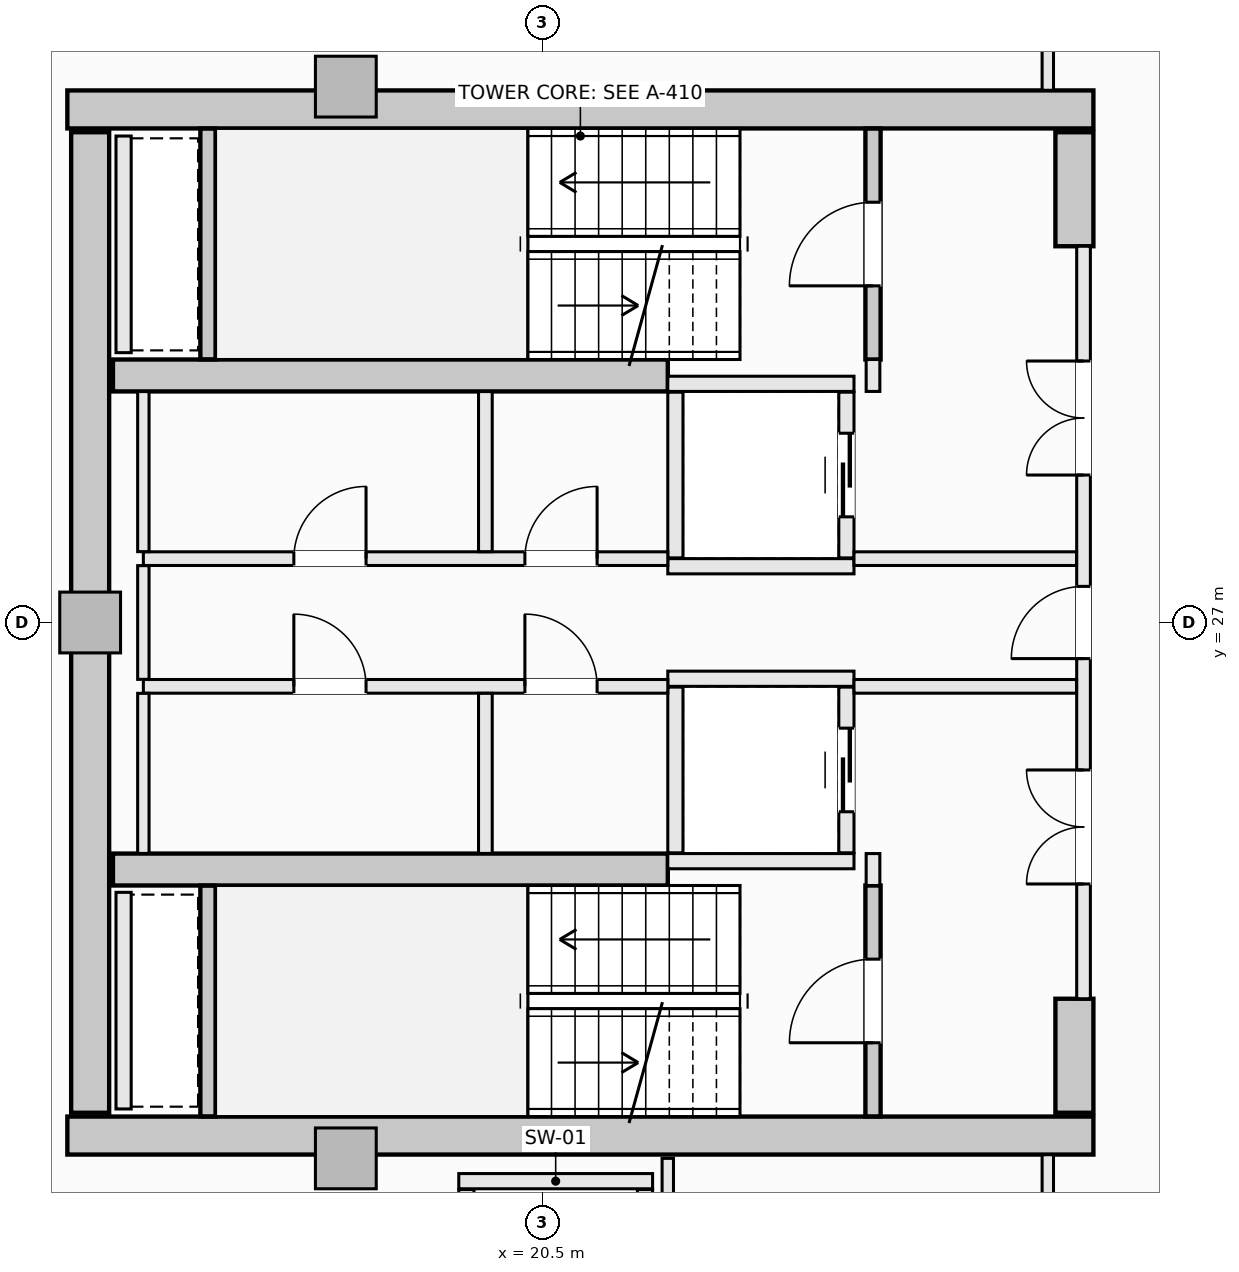
"""IFC4 building model, lengths in metres.
Left out: names, types, materials, properties, quantities, classifications, styles, units other than length and angle.
Written with IfcOpenShell. Run it as: python <this file> out.ifc"""

import sys

from ifc_helpers import new_model, si_unit, direction, frame, frame_2d, origin, origin_2d, place, context, subcontext, project, spatial, rectangle, extrude, element, fill, save


model = new_model("IFC4")
c1 = context("Model", 3, precision=1e-05, world=origin(), true_north=direction((0.0, 1.0)))
c2 = subcontext(c1, "Body", "Model", "MODEL_VIEW")
j1 = project(units=[si_unit("LENGTHUNIT", "METRE"), si_unit("PLANEANGLEUNIT", "RADIAN")], contexts=[c1])
p1 = place(None, origin())
s1 = spatial("IfcSite", under=j1, at=p1, CompositionType="ELEMENT")
p2 = place(p1, origin())
s2 = spatial("IfcBuilding", under=s1, at=p2, CompositionType="ELEMENT")
p3 = place(p2, frame((0.0, 0.0, 236.0)))
s3 = spatial("IfcBuildingStorey", under=s2, at=p3, CompositionType="ELEMENT", Elevation=236.0)
for number, where, z_axis, x_axis in (
    (1, (14.25, 33.75, -0.27), (0.0, 0.0, 1.0), (1.0, 0.0, 0.0)),
    (2, (14.25, 20.25, -0.27), (0.0, 0.0, 1.0), (1.0, 0.0, 0.0)),
):
    element("IfcWall", number, at=place(p3, frame(where, z_axis=z_axis, x_axis=x_axis)), inside=s3, PredefinedType="SHEAR", context=c2, shape_type="SweptSolid", body=[
        extrude(rectangle(XDim=13.5, YDim=0.5, at=frame_2d((6.75, 0.0))), origin(), (0.0, 0.0, 1.0), 3.3),
    ])
p4 = place(p3, frame((14.55, 20.55, -0.27), z_axis=(0.0, 0.0, 1.0), x_axis=(0.0, 1.0, 0.0)))
e3 = element("IfcWall", 3, at=p4, inside=s3, PredefinedType="SHEAR", context=c2, shape_type="SweptSolid", body=[
    extrude(rectangle(XDim=12.9, YDim=0.5, at=frame_2d((6.45, 0.0))), origin(), (0.0, 0.0, 1.0), 3.3),
])
for number, where, z_axis, x_axis in (
    (4, (27.5, 31.95, -0.27), (0.0, 0.0, 1.0), (0.0, 1.0, 0.0)),
    (5, (27.5, 20.55, -0.27), (0.0, 0.0, 1.0), (0.0, 1.0, 0.0)),
):
    element("IfcWall", number, at=place(p3, frame(where, z_axis=z_axis, x_axis=x_axis)), inside=s3, PredefinedType="SHEAR", context=c2, shape_type="SweptSolid", body=[
        extrude(rectangle(XDim=1.5, YDim=0.5, at=frame_2d((0.75, 0.0))), origin(), (0.0, 0.0, 1.0), 3.3),
    ])
for number, where, z_axis, x_axis in (
    (6, (14.85, 30.25, -0.27), (0.0, 0.0, 1.0), (1.0, 0.0, 0.0)),
    (7, (14.85, 23.75, -0.27), (0.0, 0.0, 1.0), (1.0, 0.0, 0.0)),
):
    element("IfcWall", number, at=place(p3, frame(where, z_axis=z_axis, x_axis=x_axis)), inside=s3, PredefinedType="SHEAR", context=c2, shape_type="SweptSolid", body=[
        extrude(rectangle(XDim=7.3, YDim=0.42, at=frame_2d((3.65, 0.0))), origin(), (0.0, 0.0, 1.0), 3.3),
    ])
for number, where, z_axis, x_axis in (
    (8, (17.914, 34.05, -0.27), (0.0, 0.0, 1.0), (1.0, 0.0, 0.0)),
    (9, (14.55, 27.0, -0.27), (0.0, 0.0, 1.0), (1.0, 0.0, 0.0)),
    (10, (17.914, 19.95, -0.27), (0.0, 0.0, 1.0), (1.0, 0.0, 0.0)),
):
    element("IfcColumn", number, at=place(p3, frame(where, z_axis=z_axis, x_axis=x_axis)), inside=s3, PredefinedType="PILASTER", context=c2, shape_type="SweptSolid", body=[
        extrude(rectangle(XDim=0.8, YDim=0.8, at=origin_2d()), origin(), (0.0, 0.0, 1.0), 3.3),
    ])
p5 = place(p3, frame((24.85, 30.46, -0.27), z_axis=(0.0, 0.0, 1.0), x_axis=(0.0, 1.0, 0.0)))
e11 = element("IfcWall", 11, at=p5, inside=s3, PredefinedType="SHEAR", context=c2, shape_type="SweptSolid", body=[
    extrude(rectangle(XDim=3.038, YDim=0.2, at=frame_2d((1.519, 0.0))), origin(), (0.0, 0.0, 1.0), 3.3),
])
p6 = place(p5, frame((0.969, 0.0, 0.27)))
e12 = element("IfcOpeningElement", 12, at=p6, cuts=e11, PredefinedType="OPENING", context=c2, shape_type="SweptSolid", body=[
    extrude(rectangle(XDim=1.1, YDim=2.15, at=frame_2d((0.55, 1.075))), frame((0.0, 0.11, 0.0), z_axis=(0.0, -1.0, 0.0), x_axis=(1.0, 0.0, 0.0)), (0.0, 0.0, 1.0), 0.22),
])
p7 = place(p3, frame((16.1, 30.462, -0.27), z_axis=(0.0, 0.0, 1.0), x_axis=(0.0, 1.0, 0.0)))
e13 = element("IfcWall", 13, at=p7, inside=s3, PredefinedType="SHEAR", context=c2, shape_type="SweptSolid", body=[
    extrude(rectangle(XDim=3.036, YDim=0.2, at=frame_2d((1.518, 0.0))), origin(), (0.0, 0.0, 1.0), 3.3),
])
p8 = place(p3, frame((24.85, 20.502, -0.27), z_axis=(0.0, 0.0, 1.0), x_axis=(0.0, 1.0, 0.0)))
e14 = element("IfcWall", 14, at=p8, inside=s3, PredefinedType="SHEAR", context=c2, shape_type="SweptSolid", body=[
    extrude(rectangle(XDim=3.038, YDim=0.2, at=frame_2d((1.519, 0.0))), origin(), (0.0, 0.0, 1.0), 3.3),
])
p9 = place(p8, frame((0.969, 0.0, 0.27)))
e15 = element("IfcOpeningElement", 15, at=p9, cuts=e14, PredefinedType="OPENING", context=c2, shape_type="SweptSolid", body=[
    extrude(rectangle(XDim=1.1, YDim=2.15, at=frame_2d((0.55, 1.075))), frame((0.0, 0.11, 0.0), z_axis=(0.0, -1.0, 0.0), x_axis=(1.0, 0.0, 0.0)), (0.0, 0.0, 1.0), 0.22),
])
p10 = place(p3, frame((16.1, 20.502, -0.27), z_axis=(0.0, 0.0, 1.0), x_axis=(0.0, 1.0, 0.0)))
e16 = element("IfcWall", 16, at=p10, inside=s3, PredefinedType="SHEAR", context=c2, shape_type="SweptSolid", body=[
    extrude(rectangle(XDim=3.036, YDim=0.2, at=frame_2d((1.518, 0.0))), origin(), (0.0, 0.0, 1.0), 3.3),
])
for number, where, z_axis, x_axis in (
    (17, (22.15, 30.14, 0.0), (0.0, 0.0, 1.0), (1.0, 0.0, 0.0)),
    (18, (22.15, 27.74, 0.0), (0.0, 0.0, 1.0), (1.0, 0.0, 0.0)),
):
    element("IfcWall", number, at=place(p3, frame(where, z_axis=z_axis, x_axis=x_axis)), inside=s3, PredefinedType="SOLIDWALL", context=c2, shape_type="SweptSolid", body=[
        extrude(rectangle(XDim=2.45, YDim=0.2, at=frame_2d((1.225, 0.0))), origin(), (0.0, 0.0, 1.0), 3.03),
    ])
p11 = place(p3, frame((22.25, 27.85, 0.0), z_axis=(0.0, 0.0, 1.0), x_axis=(0.0, 1.0, 0.0)))
e19 = element("IfcWall", 19, at=p11, inside=s3, PredefinedType="SOLIDWALL", context=c2, shape_type="SweptSolid", body=[
    extrude(rectangle(XDim=2.18, YDim=0.2, at=frame_2d((1.09, 0.0))), origin(), (0.0, 0.0, 1.0), 3.03),
])
p12 = place(p3, frame((24.5, 27.85, 0.0), z_axis=(0.0, 0.0, 1.0), x_axis=(0.0, 1.0, 0.0)))
e20 = element("IfcWall", 20, at=p12, inside=s3, PredefinedType="SOLIDWALL", context=c2, shape_type="SweptSolid", body=[
    extrude(rectangle(XDim=2.18, YDim=0.2, at=frame_2d((1.09, 0.0))), origin(), (0.0, 0.0, 1.0), 3.03),
])
p13 = place(p12, frame((0.54, 0.0, 0.0)))
e21 = element("IfcOpeningElement", 21, at=p13, cuts=e20, PredefinedType="OPENING", context=c2, shape_type="SweptSolid", body=[
    extrude(rectangle(XDim=1.1, YDim=2.2, at=frame_2d((0.55, 1.1))), frame((0.0, 0.11, 0.0), z_axis=(0.0, -1.0, 0.0), x_axis=(1.0, 0.0, 0.0)), (0.0, 0.0, 1.0), 0.22),
])
for number, where, z_axis, x_axis in (
    (22, (22.15, 26.26, 0.0), (0.0, 0.0, 1.0), (1.0, 0.0, 0.0)),
    (23, (22.15, 23.86, 0.0), (0.0, 0.0, 1.0), (1.0, 0.0, 0.0)),
):
    element("IfcWall", number, at=place(p3, frame(where, z_axis=z_axis, x_axis=x_axis)), inside=s3, PredefinedType="SOLIDWALL", context=c2, shape_type="SweptSolid", body=[
        extrude(rectangle(XDim=2.45, YDim=0.2, at=frame_2d((1.225, 0.0))), origin(), (0.0, 0.0, 1.0), 3.03),
    ])
p14 = place(p3, frame((22.25, 23.97, 0.0), z_axis=(0.0, 0.0, 1.0), x_axis=(0.0, 1.0, 0.0)))
e24 = element("IfcWall", 24, at=p14, inside=s3, PredefinedType="SOLIDWALL", context=c2, shape_type="SweptSolid", body=[
    extrude(rectangle(XDim=2.18, YDim=0.2, at=frame_2d((1.09, 0.0))), origin(), (0.0, 0.0, 1.0), 3.03),
])
p15 = place(p3, frame((24.5, 23.97, 0.0), z_axis=(0.0, 0.0, 1.0), x_axis=(0.0, 1.0, 0.0)))
e25 = element("IfcWall", 25, at=p15, inside=s3, PredefinedType="SOLIDWALL", context=c2, shape_type="SweptSolid", body=[
    extrude(rectangle(XDim=2.18, YDim=0.2, at=frame_2d((1.09, 0.0))), origin(), (0.0, 0.0, 1.0), 3.03),
])
p16 = place(p15, frame((0.54, 0.0, 0.0)))
e26 = element("IfcOpeningElement", 26, at=p16, cuts=e25, PredefinedType="OPENING", context=c2, shape_type="SweptSolid", body=[
    extrude(rectangle(XDim=1.1, YDim=2.2, at=frame_2d((0.55, 1.1))), frame((0.0, 0.11, 0.0), z_axis=(0.0, -1.0, 0.0), x_axis=(1.0, 0.0, 0.0)), (0.0, 0.0, 1.0), 0.22),
])
p17 = place(p3, frame((19.4, 19.65, 0.0), z_axis=(0.0, 0.0, 1.0), x_axis=(1.0, 0.0, 0.0)))
e27 = element("IfcWall", 27, at=p17, inside=s3, PredefinedType="SOLIDWALL", context=c2, shape_type="SweptSolid", body=[
    extrude(rectangle(XDim=2.55, YDim=0.2, at=frame_2d((1.275, 0.0))), origin(), (0.0, 0.0, 1.0), 3.03),
])
for number, where, z_axis, x_axis in (
    (28, (19.5, 17.01, 0.0), (0.0, 0.0, 1.0), (0.0, 1.0, 0.0)),
    (29, (21.85, 17.01, 0.0), (0.0, 0.0, 1.0), (0.0, 1.0, 0.0)),
):
    element("IfcWall", number, at=place(p3, frame(where, z_axis=z_axis, x_axis=x_axis)), inside=s3, PredefinedType="SOLIDWALL", context=c2, shape_type="SweptSolid", body=[
        extrude(rectangle(XDim=2.53, YDim=0.2, at=frame_2d((1.265, 0.0))), origin(), (0.0, 0.0, 1.0), 3.03),
    ])
for number, where, z_axis, x_axis in (
    (30, (14.99, 30.55, 0.0), (0.0, 0.0, 1.0), (0.0, 1.0, 0.0)),
    (31, (14.99, 20.6, 0.0), (0.0, 0.0, 1.0), (0.0, 1.0, 0.0)),
):
    element("IfcWall", number, at=place(p3, frame(where, z_axis=z_axis, x_axis=x_axis)), inside=s3, PredefinedType="SOLIDWALL", context=c2, shape_type="SweptSolid", body=[
        extrude(rectangle(XDim=2.85, YDim=0.2, at=frame_2d((1.425, 0.0))), origin(), (0.0, 0.0, 1.0), 3.03),
    ])
for number, where, z_axis, x_axis in (
    (32, (24.85, 23.54, 0.0), (0.0, 0.0, 1.0), (0.0, 1.0, 0.0)),
    (33, (24.85, 30.04, 0.0), (0.0, 0.0, 1.0), (0.0, 1.0, 0.0)),
):
    element("IfcWall", number, at=place(p3, frame(where, z_axis=z_axis, x_axis=x_axis)), inside=s3, PredefinedType="SOLIDWALL", context=c2, shape_type="SweptSolid", body=[
        extrude(rectangle(XDim=0.42, YDim=0.18, at=frame_2d((0.21, 0.0))), origin(), (0.0, 0.0, 1.0), 3.03),
    ])
p18 = place(p3, frame((27.62, 22.05, 0.0), z_axis=(0.0, 0.0, 1.0), x_axis=(0.0, 1.0, 0.0)))
e34 = element("IfcWall", 34, at=p18, inside=s3, PredefinedType="SOLIDWALL", context=c2, shape_type="SweptSolid", body=[
    extrude(rectangle(XDim=9.9, YDim=0.18, at=frame_2d((4.95, 0.0))), origin(), (0.0, 0.0, 1.0), 3.03),
])
p19 = place(p18, frame((4.475, 0.0, 0.0)))
e35 = element("IfcOpeningElement", 35, at=p19, cuts=e34, PredefinedType="OPENING", context=c2, shape_type="SweptSolid", body=[
    extrude(rectangle(XDim=0.95, YDim=2.1, at=frame_2d((0.475, 1.05))), frame((0.0, 0.1, 0.0), z_axis=(0.0, -1.0, 0.0), x_axis=(1.0, 0.0, 0.0)), (0.0, 0.0, 1.0), 0.2),
])
p20 = place(p18, frame((6.89, 0.0, 0.0)))
e36 = element("IfcOpeningElement", 36, at=p20, cuts=e34, PredefinedType="OPENING", context=c2, shape_type="SweptSolid", body=[
    extrude(rectangle(XDim=1.5, YDim=2.2, at=frame_2d((0.75, 1.1))), frame((0.0, 0.1, 0.0), z_axis=(0.0, -1.0, 0.0), x_axis=(1.0, 0.0, 0.0)), (0.0, 0.0, 1.0), 0.2),
])
p21 = place(p18, frame((1.51, 0.0, 0.0)))
e37 = element("IfcOpeningElement", 37, at=p21, cuts=e34, PredefinedType="OPENING", context=c2, shape_type="SweptSolid", body=[
    extrude(rectangle(XDim=1.5, YDim=2.2, at=frame_2d((0.75, 1.1))), frame((0.0, 0.1, 0.0), z_axis=(0.0, -1.0, 0.0), x_axis=(1.0, 0.0, 0.0)), (0.0, 0.0, 1.0), 0.2),
])
p22 = place(p3, frame((15.25, 27.84, 0.0), z_axis=(0.0, 0.0, 1.0), x_axis=(1.0, 0.0, 0.0)))
e38 = element("IfcWall", 38, at=p22, inside=s3, PredefinedType="SOLIDWALL", context=c2, shape_type="SweptSolid", body=[
    extrude(rectangle(XDim=6.9, YDim=0.18, at=frame_2d((3.45, 0.0))), origin(), (0.0, 0.0, 1.0), 3.03),
])
p23 = place(p22, frame((5.02, 0.0, 0.0)))
e39 = element("IfcOpeningElement", 39, at=p23, cuts=e38, PredefinedType="OPENING", context=c2, shape_type="SweptSolid", body=[
    extrude(rectangle(XDim=0.95, YDim=2.1, at=frame_2d((0.475, 1.05))), frame((0.0, 0.1, 0.0), z_axis=(0.0, -1.0, 0.0), x_axis=(1.0, 0.0, 0.0)), (0.0, 0.0, 1.0), 0.2),
])
p24 = place(p22, frame((1.98, 0.0, 0.0)))
e40 = element("IfcOpeningElement", 40, at=p24, cuts=e38, PredefinedType="OPENING", context=c2, shape_type="SweptSolid", body=[
    extrude(rectangle(XDim=0.95, YDim=2.1, at=frame_2d((0.475, 1.05))), frame((0.0, 0.1, 0.0), z_axis=(0.0, -1.0, 0.0), x_axis=(1.0, 0.0, 0.0)), (0.0, 0.0, 1.0), 0.2),
])
p25 = place(p3, frame((24.6, 27.84, 0.0), z_axis=(0.0, 0.0, 1.0), x_axis=(1.0, 0.0, 0.0)))
e41 = element("IfcWall", 41, at=p25, inside=s3, PredefinedType="SOLIDWALL", context=c2, shape_type="SweptSolid", body=[
    extrude(rectangle(XDim=2.928, YDim=0.18, at=frame_2d((1.464, 0.0))), origin(), (0.0, 0.0, 1.0), 3.03),
])
p26 = place(p3, frame((15.25, 26.16, 0.0), z_axis=(0.0, 0.0, 1.0), x_axis=(1.0, 0.0, 0.0)))
e42 = element("IfcWall", 42, at=p26, inside=s3, PredefinedType="SOLIDWALL", context=c2, shape_type="SweptSolid", body=[
    extrude(rectangle(XDim=6.9, YDim=0.18, at=frame_2d((3.45, 0.0))), origin(), (0.0, 0.0, 1.0), 3.03),
])
p27 = place(p26, frame((5.02, 0.0, 0.0)))
e43 = element("IfcOpeningElement", 43, at=p27, cuts=e42, PredefinedType="OPENING", context=c2, shape_type="SweptSolid", body=[
    extrude(rectangle(XDim=0.95, YDim=2.1, at=frame_2d((0.475, 1.05))), frame((0.0, 0.1, 0.0), z_axis=(0.0, -1.0, 0.0), x_axis=(1.0, 0.0, 0.0)), (0.0, 0.0, 1.0), 0.2),
])
p28 = place(p26, frame((1.98, 0.0, 0.0)))
e44 = element("IfcOpeningElement", 44, at=p28, cuts=e42, PredefinedType="OPENING", context=c2, shape_type="SweptSolid", body=[
    extrude(rectangle(XDim=0.95, YDim=2.1, at=frame_2d((0.475, 1.05))), frame((0.0, 0.1, 0.0), z_axis=(0.0, -1.0, 0.0), x_axis=(1.0, 0.0, 0.0)), (0.0, 0.0, 1.0), 0.2),
])
p29 = place(p3, frame((24.6, 26.16, 0.0), z_axis=(0.0, 0.0, 1.0), x_axis=(1.0, 0.0, 0.0)))
e45 = element("IfcWall", 45, at=p29, inside=s3, PredefinedType="SOLIDWALL", context=c2, shape_type="SweptSolid", body=[
    extrude(rectangle(XDim=2.928, YDim=0.18, at=frame_2d((1.464, 0.0))), origin(), (0.0, 0.0, 1.0), 3.03),
])
p30 = place(p3, frame((15.25, 23.962, 0.0), z_axis=(0.0, 0.0, 1.0), x_axis=(0.0, 1.0, 0.0)))
e46 = element("IfcWall", 46, at=p30, inside=s3, PredefinedType="PARTITIONING", context=c2, shape_type="SweptSolid", body=[
    extrude(rectangle(XDim=2.106, YDim=0.15, at=frame_2d((1.053, 0.0))), origin(), (0.0, 0.0, 1.0), 3.03),
])
p31 = place(p3, frame((15.25, 26.252, 0.0), z_axis=(0.0, 0.0, 1.0), x_axis=(0.0, 1.0, 0.0)))
e47 = element("IfcWall", 47, at=p31, inside=s3, PredefinedType="PARTITIONING", context=c2, shape_type="SweptSolid", body=[
    extrude(rectangle(XDim=1.496, YDim=0.15, at=frame_2d((0.748, 0.0))), origin(), (0.0, 0.0, 1.0), 3.03),
])
p32 = place(p3, frame((15.25, 27.932, 0.0), z_axis=(0.0, 0.0, 1.0), x_axis=(0.0, 1.0, 0.0)))
e48 = element("IfcWall", 48, at=p32, inside=s3, PredefinedType="PARTITIONING", context=c2, shape_type="SweptSolid", body=[
    extrude(rectangle(XDim=2.106, YDim=0.15, at=frame_2d((1.053, 0.0))), origin(), (0.0, 0.0, 1.0), 3.03),
])
for number, where, z_axis, x_axis in (
    (49, (19.75, 23.962, 0.0), (0.0, 0.0, 1.0), (0.0, 1.0, 0.0)),
    (50, (19.75, 27.932, 0.0), (0.0, 0.0, 1.0), (0.0, 1.0, 0.0)),
):
    element("IfcWall", number, at=place(p3, frame(where, z_axis=z_axis, x_axis=x_axis)), inside=s3, PredefinedType="SOLIDWALL", context=c2, shape_type="SweptSolid", body=[
        extrude(rectangle(XDim=2.106, YDim=0.18, at=frame_2d((1.053, 0.0))), origin(), (0.0, 0.0, 1.0), 3.03),
    ])
p33 = place(p3, frame((22.15, 17.127, 0.0), z_axis=(0.0, 0.0, 1.0), x_axis=(0.0, 1.0, 0.0)))
e51 = element("IfcWall", 51, at=p33, inside=s3, PredefinedType="PARTITIONING", context=c2, shape_type="SweptSolid", body=[
    extrude(rectangle(XDim=2.823, YDim=0.15, at=frame_2d((1.412, 0.0))), origin(), (0.0, 0.0, 1.0), 3.03),
])
p34 = place(p3, frame((27.15, 17.127, 0.0), z_axis=(0.0, 0.0, 1.0), x_axis=(0.0, 1.0, 0.0)))
e52 = element("IfcWall", 52, at=p34, inside=s3, PredefinedType="PARTITIONING", context=c2, shape_type="SweptSolid", body=[
    extrude(rectangle(XDim=2.871, YDim=0.15, at=frame_2d((1.436, 0.0))), origin(), (0.0, 0.0, 1.0), 3.03),
])
p35 = place(p34, frame((0.96, 0.0, 0.0)))
e53 = element("IfcOpeningElement", 53, at=p35, cuts=e52, PredefinedType="OPENING", context=c2, shape_type="SweptSolid", body=[
    extrude(rectangle(XDim=0.95, YDim=2.1, at=frame_2d((0.475, 1.05))), frame((0.0, 0.085, 0.0), z_axis=(0.0, -1.0, 0.0), x_axis=(1.0, 0.0, 0.0)), (0.0, 0.0, 1.0), 0.17),
])
p36 = place(p3, frame((27.15, 34.002, 0.0), z_axis=(0.0, 0.0, 1.0), x_axis=(0.0, 1.0, 0.0)))
e54 = element("IfcWall", 54, at=p36, inside=s3, PredefinedType="PARTITIONING", context=c2, shape_type="SweptSolid", body=[
    extrude(rectangle(XDim=4.198, YDim=0.15, at=frame_2d((2.099, 0.0))), origin(), (0.0, 0.0, 1.0), 3.03),
])
p37 = place(p36, frame((1.998, 0.0, 0.0)))
e55 = element("IfcOpeningElement", 55, at=p37, cuts=e54, PredefinedType="OPENING", context=c2, shape_type="SweptSolid", body=[
    extrude(rectangle(XDim=0.95, YDim=2.1, at=frame_2d((0.475, 1.05))), frame((0.0, 0.085, 0.0), z_axis=(0.0, -1.0, 0.0), x_axis=(1.0, 0.0, 0.0)), (0.0, 0.0, 1.0), 0.17),
])
p38 = place(p6, origin())
e56 = element("IfcDoor", 56, at=p38, inside=s3, OperationType="SINGLE_SWING_LEFT", PredefinedType="DOOR", context=c2, shape_type="SweptSolid", body=[
    extrude(rectangle(XDim=1.1, YDim=2.15, at=frame_2d((0.55, 1.075))), frame((0.0, 0.025, 0.0), z_axis=(0.0, -1.0, 0.0), x_axis=(1.0, 0.0, 0.0)), (0.0, 0.0, 1.0), 0.05),
])
fill(e12, e56)
p39 = place(p9, origin())
e57 = element("IfcDoor", 57, at=p39, inside=s3, OperationType="SINGLE_SWING_LEFT", PredefinedType="DOOR", context=c2, shape_type="SweptSolid", body=[
    extrude(rectangle(XDim=1.1, YDim=2.15, at=frame_2d((0.55, 1.075))), frame((0.0, 0.025, 0.0), z_axis=(0.0, -1.0, 0.0), x_axis=(1.0, 0.0, 0.0)), (0.0, 0.0, 1.0), 0.05),
])
fill(e15, e57)
p40 = place(p13, origin())
e58 = element("IfcDoor", 58, at=p40, inside=s3, OperationType="SLIDING_TO_LEFT", PredefinedType="DOOR", context=c2, shape_type="SweptSolid", body=[
    extrude(rectangle(XDim=1.1, YDim=2.2, at=frame_2d((0.55, 1.1))), frame((0.0, 0.025, 0.0), z_axis=(0.0, -1.0, 0.0), x_axis=(1.0, 0.0, 0.0)), (0.0, 0.0, 1.0), 0.05),
])
fill(e21, e58)
p41 = place(p16, origin())
e59 = element("IfcDoor", 59, at=p41, inside=s3, OperationType="SLIDING_TO_LEFT", PredefinedType="DOOR", context=c2, shape_type="SweptSolid", body=[
    extrude(rectangle(XDim=1.1, YDim=2.2, at=frame_2d((0.55, 1.1))), frame((0.0, 0.025, 0.0), z_axis=(0.0, -1.0, 0.0), x_axis=(1.0, 0.0, 0.0)), (0.0, 0.0, 1.0), 0.05),
])
fill(e26, e59)
p42 = place(p19, origin())
e60 = element("IfcDoor", 60, at=p42, inside=s3, OperationType="SINGLE_SWING_LEFT", PredefinedType="DOOR", context=c2, shape_type="SweptSolid", body=[
    extrude(rectangle(XDim=0.95, YDim=2.1, at=frame_2d((0.475, 1.05))), frame((0.0, 0.025, 0.0), z_axis=(0.0, -1.0, 0.0), x_axis=(1.0, 0.0, 0.0)), (0.0, 0.0, 1.0), 0.05),
])
fill(e35, e60)
p43 = place(p20, origin())
e61 = element("IfcDoor", 61, at=p43, inside=s3, OperationType="DOUBLE_DOOR_SINGLE_SWING", PredefinedType="DOOR", context=c2, shape_type="SweptSolid", body=[
    extrude(rectangle(XDim=1.5, YDim=2.2, at=frame_2d((0.75, 1.1))), frame((0.0, 0.025, 0.0), z_axis=(0.0, -1.0, 0.0), x_axis=(1.0, 0.0, 0.0)), (0.0, 0.0, 1.0), 0.05),
])
fill(e36, e61)
p44 = place(p21, origin())
e62 = element("IfcDoor", 62, at=p44, inside=s3, OperationType="DOUBLE_DOOR_SINGLE_SWING", PredefinedType="DOOR", context=c2, shape_type="SweptSolid", body=[
    extrude(rectangle(XDim=1.5, YDim=2.2, at=frame_2d((0.75, 1.1))), frame((0.0, 0.025, 0.0), z_axis=(0.0, -1.0, 0.0), x_axis=(1.0, 0.0, 0.0)), (0.0, 0.0, 1.0), 0.05),
])
fill(e37, e62)
p45 = place(p23, origin())
e63 = element("IfcDoor", 63, at=p45, inside=s3, OperationType="SINGLE_SWING_RIGHT", PredefinedType="DOOR", context=c2, shape_type="SweptSolid", body=[
    extrude(rectangle(XDim=0.95, YDim=2.1, at=frame_2d((0.475, 1.05))), frame((0.0, 0.025, 0.0), z_axis=(0.0, -1.0, 0.0), x_axis=(1.0, 0.0, 0.0)), (0.0, 0.0, 1.0), 0.05),
])
fill(e39, e63)
p46 = place(p27, origin())
e64 = element("IfcDoor", 64, at=p46, inside=s3, OperationType="SINGLE_SWING_LEFT", PredefinedType="DOOR", context=c2, shape_type="SweptSolid", body=[
    extrude(rectangle(XDim=0.95, YDim=2.1, at=frame_2d((0.475, 1.05))), frame((0.0, 0.025, 0.0), z_axis=(0.0, -1.0, 0.0), x_axis=(1.0, 0.0, 0.0)), (0.0, 0.0, 1.0), 0.05),
])
fill(e43, e64)
p47 = place(p24, origin())
e65 = element("IfcDoor", 65, at=p47, inside=s3, OperationType="SINGLE_SWING_RIGHT", PredefinedType="DOOR", context=c2, shape_type="SweptSolid", body=[
    extrude(rectangle(XDim=0.95, YDim=2.1, at=frame_2d((0.475, 1.05))), frame((0.0, 0.025, 0.0), z_axis=(0.0, -1.0, 0.0), x_axis=(1.0, 0.0, 0.0)), (0.0, 0.0, 1.0), 0.05),
])
fill(e40, e65)
p48 = place(p28, origin())
e66 = element("IfcDoor", 66, at=p48, inside=s3, OperationType="SINGLE_SWING_LEFT", PredefinedType="DOOR", context=c2, shape_type="SweptSolid", body=[
    extrude(rectangle(XDim=0.95, YDim=2.1, at=frame_2d((0.475, 1.05))), frame((0.0, 0.025, 0.0), z_axis=(0.0, -1.0, 0.0), x_axis=(1.0, 0.0, 0.0)), (0.0, 0.0, 1.0), 0.05),
])
fill(e44, e66)
save(model, sys.argv[1])
